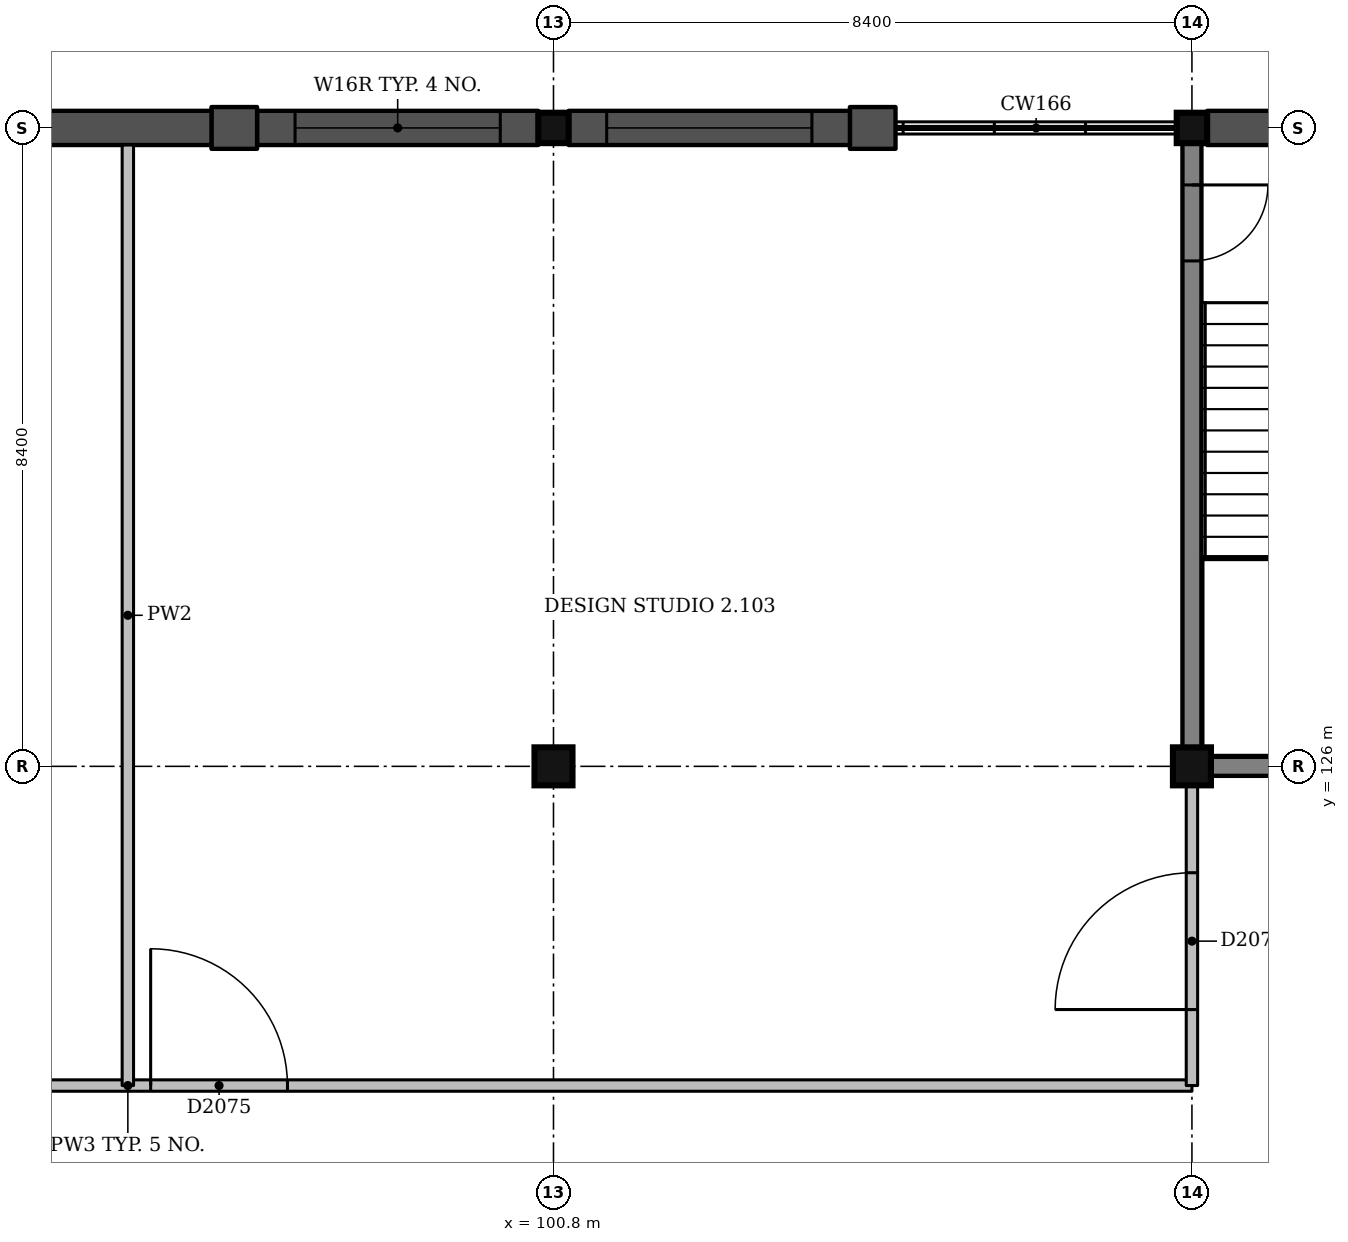
"""IFC4 building model, lengths in metres.
Left out: names, types, materials, properties, quantities, classifications, styles, units other than length and angle.
Written with IfcOpenShell. Run it as: python <this file> out.ifc"""

import sys

from ifc_helpers import new_model, si_unit, direction, frame, frame_2d, origin, origin_2d, place, context, subcontext, project, spatial, rectangle, extrude, element, fill, save


model = new_model("IFC4")
c1 = context("Model", 3, precision=1e-05, world=origin(), true_north=direction((0.0, 1.0)))
c2 = subcontext(c1, "Body", "Model", "MODEL_VIEW")
j1 = project(units=[si_unit("LENGTHUNIT", "METRE"), si_unit("PLANEANGLEUNIT", "RADIAN")], contexts=[c1])
p1 = place(None, origin())
s1 = spatial("IfcSite", under=j1, at=p1, CompositionType="ELEMENT")
p2 = place(p1, origin())
s2 = spatial("IfcBuilding", under=s1, at=p2, CompositionType="ELEMENT")
p3 = place(p2, frame((0.0, 0.0, 9.0)))
s3 = spatial("IfcBuildingStorey", under=s2, at=p3, CompositionType="ELEMENT", Elevation=9.0)
p4 = place(p3, frame((100.8, 126.0, -1.5), z_axis=(0.0, 0.0, 1.0), x_axis=(1.0, 0.0, 0.0)))
e1 = element("IfcColumn", 1, at=p4, inside=s3, PredefinedType="COLUMN", context=c2, shape_type="SweptSolid", body=[
    extrude(rectangle(XDim=0.5, YDim=0.5, at=origin_2d()), origin(), (0.0, 0.0, 1.0), 6.0),
])
p5 = place(p3, frame((100.8, 134.4, -1.5), z_axis=(0.0, 0.0, 1.0), x_axis=(1.0, 0.0, 0.0)))
e2 = element("IfcColumn", 2, at=p5, inside=s3, PredefinedType="COLUMN", context=c2, shape_type="SweptSolid", body=[
    extrude(rectangle(XDim=0.4, YDim=0.4, at=origin_2d()), origin(), (0.0, 0.0, 1.0), 6.0),
])
p6 = place(p3, frame((109.2, 126.0, -1.5), z_axis=(0.0, 0.0, 1.0), x_axis=(1.0, 0.0, 0.0)))
e3 = element("IfcColumn", 3, at=p6, inside=s3, PredefinedType="COLUMN", context=c2, shape_type="SweptSolid", body=[
    extrude(rectangle(XDim=0.5, YDim=0.5, at=origin_2d()), origin(), (0.0, 0.0, 1.0), 6.0),
])
p7 = place(p3, frame((109.2, 134.4, -1.5), z_axis=(0.0, 0.0, 1.0), x_axis=(1.0, 0.0, 0.0)))
e4 = element("IfcColumn", 4, at=p7, inside=s3, PredefinedType="COLUMN", context=c2, shape_type="SweptSolid", body=[
    extrude(rectangle(XDim=0.4, YDim=0.4, at=origin_2d()), origin(), (0.0, 0.0, 1.0), 6.0),
])
p8 = place(p3, frame((109.45, 126.0, 0.0), z_axis=(0.0, 0.0, 1.0), x_axis=(1.0, 0.0, 0.0)))
e5 = element("IfcWall", 5, at=p8, inside=s3, PredefinedType="SHEAR", context=c2, shape_type="SweptSolid", body=[
    extrude(rectangle(XDim=5.475, YDim=0.25, at=frame_2d((2.738, 0.0))), origin(), (0.0, 0.0, 1.0), 4.5),
])
p9 = place(p3, frame((109.2, 126.25, 0.0), z_axis=(0.0, 0.0, 1.0), x_axis=(0.0, 1.0, 0.0)))
e6 = element("IfcWall", 6, at=p9, inside=s3, PredefinedType="SHEAR", context=c2, shape_type="SweptSolid", body=[
    extrude(rectangle(XDim=7.95, YDim=0.25, at=frame_2d((3.975, 0.0))), origin(), (0.0, 0.0, 1.0), 4.5),
])
p10 = place(p9, frame((6.4, 0.0, 0.0)))
e7 = element("IfcOpeningElement", 7, at=p10, cuts=e6, PredefinedType="OPENING", context=c2, shape_type="SweptSolid", body=[
    extrude(rectangle(XDim=1.0, YDim=2.1, at=frame_2d((0.5, 1.05))), frame((0.0, 0.135, 0.0), z_axis=(0.0, -1.0, 0.0), x_axis=(1.0, 0.0, 0.0)), (0.0, 0.0, 1.0), 0.27),
])
p11 = place(p3, frame((113.1, 134.4, 0.0), z_axis=(0.0, 0.0, 1.0), x_axis=(-1.0, 0.0, 0.0)))
e8 = element("IfcWall", 8, at=p11, inside=s3, PredefinedType="SOLIDWALL", context=c2, shape_type="SweptSolid", body=[
    extrude(rectangle(XDim=3.7, YDim=0.45, at=frame_2d((1.85, 0.0))), origin(), (0.0, 0.0, 1.0), 3.45),
])
p12 = place(p11, frame((1.625, 0.0, 0.0), z_axis=(0.0, 0.0, 1.0), x_axis=(-1.0, 0.0, 0.0)))
e9 = element("IfcOpeningElement", 9, at=p12, cuts=e8, PredefinedType="OPENING", context=c2, shape_type="SweptSolid", body=[
    extrude(rectangle(XDim=1.0, YDim=2.1, at=frame_2d((0.5, 1.05))), frame((0.0, 0.235, 0.0), z_axis=(0.0, -1.0, 0.0), x_axis=(1.0, 0.0, 0.0)), (0.0, 0.0, 1.0), 0.47),
])
p13 = place(p3, frame((105.3, 134.4, 0.0), z_axis=(0.0, 0.0, 1.0), x_axis=(-1.0, 0.0, 0.0)))
e10 = element("IfcWall", 10, at=p13, inside=s3, PredefinedType="SOLIDWALL", context=c2, shape_type="SweptSolid", body=[
    extrude(rectangle(XDim=0.6, YDim=0.55, at=frame_2d((0.3, 0.0))), origin(), (0.0, 0.0, 1.0), 3.45),
])
p14 = place(p3, frame((104.7, 134.4, 0.0), z_axis=(0.0, 0.0, 1.0), x_axis=(-1.0, 0.0, 0.0)))
e11 = element("IfcWall", 11, at=p14, inside=s3, PredefinedType="SOLIDWALL", context=c2, shape_type="SweptSolid", body=[
    extrude(rectangle(XDim=3.7, YDim=0.45, at=frame_2d((1.85, 0.0))), origin(), (0.0, 0.0, 1.0), 3.45),
])
p15 = place(p14, frame((0.5, 0.0, 0.6)))
e12 = element("IfcOpeningElement", 12, at=p15, cuts=e11, PredefinedType="OPENING", context=c2, shape_type="SweptSolid", body=[
    extrude(rectangle(XDim=2.7, YDim=2.4, at=frame_2d((1.35, 1.2))), frame((0.0, 0.235, 0.0), z_axis=(0.0, -1.0, 0.0), x_axis=(1.0, 0.0, 0.0)), (0.0, 0.0, 1.0), 0.47),
])
p16 = place(p3, frame((100.6, 134.4, 0.0), z_axis=(0.0, 0.0, 1.0), x_axis=(-1.0, 0.0, 0.0)))
e13 = element("IfcWall", 13, at=p16, inside=s3, PredefinedType="SOLIDWALL", context=c2, shape_type="SweptSolid", body=[
    extrude(rectangle(XDim=3.7, YDim=0.45, at=frame_2d((1.85, 0.0))), origin(), (0.0, 0.0, 1.0), 3.45),
])
p17 = place(p16, frame((0.5, 0.0, 0.6)))
e14 = element("IfcOpeningElement", 14, at=p17, cuts=e13, PredefinedType="OPENING", context=c2, shape_type="SweptSolid", body=[
    extrude(rectangle(XDim=2.7, YDim=2.4, at=frame_2d((1.35, 1.2))), frame((0.0, 0.235, 0.0), z_axis=(0.0, -1.0, 0.0), x_axis=(1.0, 0.0, 0.0)), (0.0, 0.0, 1.0), 0.47),
])
p18 = place(p3, frame((96.9, 134.4, 0.0), z_axis=(0.0, 0.0, 1.0), x_axis=(-1.0, 0.0, 0.0)))
e15 = element("IfcWall", 15, at=p18, inside=s3, PredefinedType="SOLIDWALL", context=c2, shape_type="SweptSolid", body=[
    extrude(rectangle(XDim=0.6, YDim=0.55, at=frame_2d((0.3, 0.0))), origin(), (0.0, 0.0, 1.0), 3.45),
])
p19 = place(p3, frame((96.3, 134.4, 0.0), z_axis=(0.0, 0.0, 1.0), x_axis=(-1.0, 0.0, 0.0)))
e16 = element("IfcWall", 16, at=p19, inside=s3, PredefinedType="SOLIDWALL", context=c2, shape_type="SweptSolid", body=[
    extrude(rectangle(XDim=3.7, YDim=0.45, at=frame_2d((1.85, 0.0))), origin(), (0.0, 0.0, 1.0), 3.45),
])
p20 = place(p3, frame((81.2, 121.8, 0.0), z_axis=(0.0, 0.0, 1.0), x_axis=(1.0, 0.0, 0.0)))
e17 = element("IfcWall", 17, at=p20, inside=s3, PredefinedType="PARTITIONING", context=c2, shape_type="SweptSolid", body=[
    extrude(rectangle(XDim=28.0, YDim=0.15, at=frame_2d((14.0, 0.0))), origin(), (0.0, 0.0, 1.0), 3.4),
])
p21 = place(p20, frame((0.3, 0.0, 0.0)))
e18 = element("IfcOpeningElement", 18, at=p21, cuts=e17, PredefinedType="OPENING", context=c2, shape_type="SweptSolid", body=[
    extrude(rectangle(XDim=1.8, YDim=2.1, at=frame_2d((0.9, 1.05))), frame((0.0, 0.085, 0.0), z_axis=(0.0, -1.0, 0.0), x_axis=(1.0, 0.0, 0.0)), (0.0, 0.0, 1.0), 0.17),
])
p22 = place(p20, frame((14.3, 0.0, 0.0)))
e19 = element("IfcOpeningElement", 19, at=p22, cuts=e17, PredefinedType="OPENING", context=c2, shape_type="SweptSolid", body=[
    extrude(rectangle(XDim=1.8, YDim=2.1, at=frame_2d((0.9, 1.05))), frame((0.0, 0.085, 0.0), z_axis=(0.0, -1.0, 0.0), x_axis=(1.0, 0.0, 0.0)), (0.0, 0.0, 1.0), 0.17),
])
p23 = place(p3, frame((95.2, 121.8, 0.0), z_axis=(0.0, 0.0, 1.0), x_axis=(0.0, 1.0, 0.0)))
e20 = element("IfcWall", 20, at=p23, inside=s3, PredefinedType="PARTITIONING", context=c2, shape_type="SweptSolid", body=[
    extrude(rectangle(XDim=12.375, YDim=0.15, at=frame_2d((6.188, 0.0))), origin(), (0.0, 0.0, 1.0), 3.5),
])
p24 = place(p3, frame((109.2, 121.8, 0.0), z_axis=(0.0, 0.0, 1.0), x_axis=(0.0, 1.0, 0.0)))
e21 = element("IfcWall", 21, at=p24, inside=s3, PredefinedType="PARTITIONING", context=c2, shape_type="SweptSolid", body=[
    extrude(rectangle(XDim=3.95, YDim=0.15, at=frame_2d((1.975, 0.0))), origin(), (0.0, 0.0, 1.0), 3.5),
])
p25 = place(p24, frame((1.0, 0.0, 0.0)))
e22 = element("IfcOpeningElement", 22, at=p25, cuts=e21, PredefinedType="OPENING", context=c2, shape_type="SweptSolid", body=[
    extrude(rectangle(XDim=1.8, YDim=2.1, at=frame_2d((0.9, 1.05))), frame((0.0, 0.085, 0.0), z_axis=(0.0, -1.0, 0.0), x_axis=(1.0, 0.0, 0.0)), (0.0, 0.0, 1.0), 0.17),
])
p26 = place(p15, origin())
e23 = element("IfcWindow", 23, at=p26, inside=s3, PartitioningType="SINGLE_PANEL", PredefinedType="WINDOW", context=c2, shape_type="SweptSolid", body=[
    extrude(rectangle(XDim=2.7, YDim=2.4, at=frame_2d((1.35, 1.2))), frame((0.0, 0.135, 0.0), z_axis=(0.0, -1.0, 0.0), x_axis=(1.0, 0.0, 0.0)), (0.0, 0.0, 1.0), 0.06),
])
fill(e12, e23)
p27 = place(p17, origin())
e24 = element("IfcWindow", 24, at=p27, inside=s3, PartitioningType="SINGLE_PANEL", PredefinedType="WINDOW", context=c2, shape_type="SweptSolid", body=[
    extrude(rectangle(XDim=2.7, YDim=2.4, at=frame_2d((1.35, 1.2))), frame((0.0, 0.135, 0.0), z_axis=(0.0, -1.0, 0.0), x_axis=(1.0, 0.0, 0.0)), (0.0, 0.0, 1.0), 0.06),
])
fill(e14, e24)
p28 = place(p25, origin())
e25 = element("IfcDoor", 25, at=p28, inside=s3, OperationType="DOUBLE_DOOR_SINGLE_SWING", PredefinedType="DOOR", context=c2, shape_type="SweptSolid", body=[
    extrude(rectangle(XDim=1.8, YDim=2.1, at=frame_2d((0.9, 1.05))), frame((0.0, 0.025, 0.0), z_axis=(0.0, -1.0, 0.0), x_axis=(1.0, 0.0, 0.0)), (0.0, 0.0, 1.0), 0.05),
])
fill(e22, e25)
p29 = place(p22, origin())
e26 = element("IfcDoor", 26, at=p29, inside=s3, OperationType="DOUBLE_DOOR_SINGLE_SWING", PredefinedType="DOOR", context=c2, shape_type="SweptSolid", body=[
    extrude(rectangle(XDim=1.8, YDim=2.1, at=frame_2d((0.9, 1.05))), frame((0.0, 0.025, 0.0), z_axis=(0.0, -1.0, 0.0), x_axis=(1.0, 0.0, 0.0)), (0.0, 0.0, 1.0), 0.05),
])
fill(e19, e26)
p30 = place(p10, origin())
e27 = element("IfcDoor", 27, at=p30, inside=s3, OperationType="SINGLE_SWING_RIGHT", PredefinedType="DOOR", context=c2, shape_type="SweptSolid", body=[
    extrude(rectangle(XDim=1.0, YDim=2.1, at=frame_2d((0.5, 1.05))), frame((0.0, 0.025, 0.0), z_axis=(0.0, -1.0, 0.0), x_axis=(1.0, 0.0, 0.0)), (0.0, 0.0, 1.0), 0.05),
])
fill(e7, e27)
save(model, sys.argv[1])
